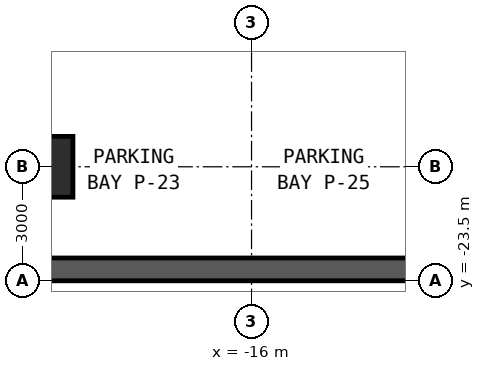
"""IFC4 building model, lengths in metres.
Left out: names, types, materials, properties, quantities, classifications, styles, units other than length and angle.
Written with IfcOpenShell. Run it as: python <this file> out.ifc"""

import sys

from ifc_helpers import new_model, si_unit, direction, frame, frame_2d, origin, origin_2d, place, context, subcontext, project, spatial, rectangle, extrude, element, save


model = new_model("IFC4")
c1 = context("Model", 3, precision=1e-05, world=origin(), true_north=direction((0.0, 1.0)))
c2 = subcontext(c1, "Body", "Model", "MODEL_VIEW")
j1 = project(units=[si_unit("LENGTHUNIT", "METRE"), si_unit("PLANEANGLEUNIT", "RADIAN")], contexts=[c1])
p1 = place(None, origin())
s1 = spatial("IfcSite", under=j1, at=p1, CompositionType="ELEMENT")
p2 = place(p1, origin())
s2 = spatial("IfcBuilding", under=s1, at=p2, CompositionType="ELEMENT")
p3 = place(p2, frame((0.0, 0.0, -10.0)))
s3 = spatial("IfcBuildingStorey", under=s2, at=p3, CompositionType="ELEMENT", Elevation=-10.0)
p4 = place(p3, frame((-34.0, -23.2, 0.0), z_axis=(0.0, 0.0, 1.0), x_axis=(1.0, 0.0, 0.0)))
e1 = element("IfcWall", 1, at=p4, inside=s3, PredefinedType="SOLIDWALL", context=c2, shape_type="SweptSolid", body=[
    extrude(rectangle(XDim=68.0, YDim=0.6, at=frame_2d((34.0, 0.0))), origin(), (0.0, 0.0, 1.0), 4.48),
])
p5 = place(p3, frame((-21.5, -20.5, 0.0), z_axis=(0.0, 0.0, 1.0), x_axis=(1.0, 0.0, 0.0)))
e2 = element("IfcColumn", 2, at=p5, inside=s3, PredefinedType="COLUMN", context=c2, shape_type="SweptSolid", body=[
    extrude(rectangle(XDim=1.6, YDim=1.6, at=origin_2d()), origin(), (0.0, 0.0, 1.0), 4.8),
])
save(model, sys.argv[1])
